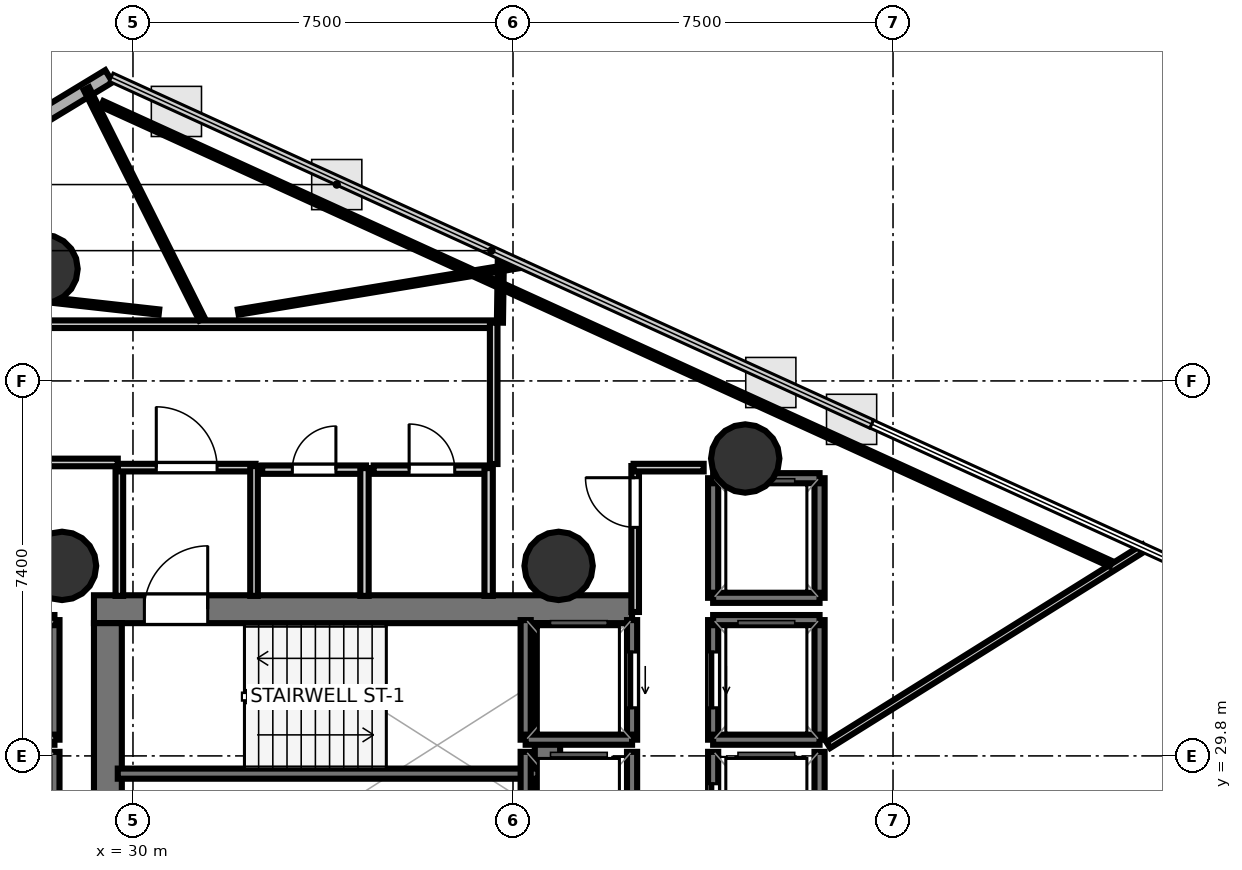
"""IFC4 building model, lengths in metres.
Left out: names, types, materials, properties, quantities, classifications, styles, units other than length and angle.
Written with IfcOpenShell. Run it as: python <this file> out.ifc"""

import sys

from ifc_helpers import new_model, si_unit, direction, frame, frame_2d, origin, origin_2d, place, context, subcontext, project, spatial, rectangle, hollow_circle, extrude, element, fill, save


model = new_model("IFC4")
c1 = context("Model", 3, precision=1e-05, world=origin(), true_north=direction((0.0, 1.0)))
c2 = subcontext(c1, "Body", "Model", "MODEL_VIEW")
j1 = project(units=[si_unit("LENGTHUNIT", "METRE"), si_unit("PLANEANGLEUNIT", "RADIAN")], contexts=[c1])
p1 = place(None, origin())
s1 = spatial("IfcSite", under=j1, at=p1, CompositionType="ELEMENT")
p2 = place(p1, origin())
s2 = spatial("IfcBuilding", under=s1, at=p2, CompositionType="ELEMENT")
p3 = place(p2, frame((0.0, 0.0, 147.6)))
s3 = spatial("IfcBuildingStorey", under=s2, at=p3, CompositionType="ELEMENT", Elevation=147.6)
p4 = place(p3, frame((29.23, 32.695, 0.0), z_axis=(0.0, 0.0, 1.0), x_axis=(1.0, 0.0, 0.0)))
e1 = element("IfcWall", 1, at=p4, inside=s3, PredefinedType="SHEAR", context=c2, shape_type="SweptSolid", body=[
    extrude(rectangle(XDim=10.62, YDim=0.55, at=frame_2d((5.31, 0.0))), origin(), (0.0, 0.0, 1.0), 3.52),
])
p5 = place(p4, frame((0.995, 0.0, 0.0)))
e2 = element("IfcOpeningElement", 2, at=p5, cuts=e1, PredefinedType="OPENING", context=c2, shape_type="SweptSolid", body=[
    extrude(rectangle(XDim=1.25, YDim=2.15, at=frame_2d((0.625, 1.075))), frame((0.0, 0.285, 0.0), z_axis=(0.0, -1.0, 0.0), x_axis=(1.0, 0.0, 0.0)), (0.0, 0.0, 1.0), 0.57),
])
p6 = place(p3, frame((29.505, 24.98, 0.0), z_axis=(0.0, 0.0, 1.0), x_axis=(0.0, 1.0, 0.0)))
e3 = element("IfcWall", 3, at=p6, inside=s3, PredefinedType="SHEAR", context=c2, shape_type="SweptSolid", body=[
    extrude(rectangle(XDim=7.44, YDim=0.55, at=frame_2d((3.72, 0.0))), origin(), (0.0, 0.0, 1.0), 3.52),
])
p7 = place(p3, frame((38.18, 24.98, 0.0), z_axis=(0.0, 0.0, 1.0), x_axis=(0.0, 1.0, 0.0)))
e4 = element("IfcWall", 4, at=p7, inside=s3, PredefinedType="SHEAR", context=c2, shape_type="SweptSolid", body=[
    extrude(rectangle(XDim=7.44, YDim=0.5, at=frame_2d((3.72, 0.0))), origin(), (0.0, 0.0, 1.0), 3.52),
])
for number, where, z_axis, x_axis in (
    (5, (28.6, 33.55, 0.0), (0.0, 0.0, 1.0), (1.0, 0.0, 0.0)),
    (6, (38.4, 33.55, 0.0), (0.0, 0.0, 1.0), (1.0, 0.0, 0.0)),
    (7, (42.083, 35.669, 0.0), (0.0, 0.0, 1.0), (1.0, 0.0, 0.0)),
    (8, (28.235, 39.411, 0.0), (0.0, 0.0, 1.0), (1.0, 0.0, 0.0)),
):
    element("IfcColumn", number, at=place(p3, frame(where, z_axis=z_axis, x_axis=x_axis)), inside=s3, PredefinedType="COLUMN", context=c2, shape_type="SweptSolid", body=[
        extrude(hollow_circle(Radius=0.675, WallThickness=0.032, at=origin_2d()), origin(), (0.0, 0.0, 1.0), 3.7),
    ])
p8 = place(p3, frame((29.525, 43.213, 0.0), z_axis=(0.0, 0.0, 1.0), x_axis=(-0.855139521109, -0.518397916119, 0.0)))
e9 = element("IfcWall", 9, at=p8, inside=s3, PredefinedType="SOLIDWALL", context=c2, shape_type="SweptSolid", body=[
    extrude(rectangle(XDim=9.28, YDim=0.28, at=frame_2d((4.64, 0.0))), origin(), (0.0, 0.0, 1.0), 3.52),
])
p9 = place(p8, frame((2.034, 0.0, 0.85)))
e10 = element("IfcOpeningElement", 10, at=p9, cuts=e9, PredefinedType="OPENING", context=c2, shape_type="SweptSolid", body=[
    extrude(rectangle(XDim=1.5, YDim=2.1, at=frame_2d((0.75, 1.05))), frame((0.0, 0.15, 0.0), z_axis=(0.0, -1.0, 0.0), x_axis=(1.0, 0.0, 0.0)), (0.0, 0.0, 1.0), 0.3),
])
p10 = place(p8, frame((5.426, 0.0, 0.85)))
e11 = element("IfcOpeningElement", 11, at=p10, cuts=e9, PredefinedType="OPENING", context=c2, shape_type="SweptSolid", body=[
    extrude(rectangle(XDim=1.5, YDim=2.1, at=frame_2d((0.75, 1.05))), frame((0.0, 0.15, 0.0), z_axis=(0.0, -1.0, 0.0), x_axis=(1.0, 0.0, 0.0)), (0.0, 0.0, 1.0), 0.3),
])
p11 = place(p3, frame((29.7, 29.45, 0.0), z_axis=(0.0, 0.0, 1.0), x_axis=(1.0, 0.0, 0.0)))
e12 = element("IfcWall", 12, at=p11, inside=s3, PredefinedType="SOLIDWALL", context=c2, shape_type="SweptSolid", body=[
    extrude(rectangle(XDim=8.3, YDim=0.2, at=frame_2d((4.15, 0.0))), origin(), (0.0, 0.0, 1.0), 3.52),
])
p12 = place(p3, frame((39.85, 30.12, 0.0), z_axis=(0.0, 0.0, 1.0), x_axis=(0.0, 1.0, 0.0)))
e13 = element("IfcWall", 13, at=p12, inside=s3, PredefinedType="SOLIDWALL", context=c2, shape_type="SweptSolid", body=[
    extrude(rectangle(XDim=2.36, YDim=0.2, at=frame_2d((1.18, 0.0))), origin(), (0.0, 0.0, 1.0), 3.52),
])
p13 = place(p12, frame((0.63, 0.0, 0.0)))
e14 = element("IfcOpeningElement", 14, at=p13, cuts=e13, PredefinedType="OPENING", context=c2, shape_type="SweptSolid", body=[
    extrude(rectangle(XDim=1.1, YDim=2.15, at=frame_2d((0.55, 1.075))), frame((0.0, 0.11, 0.0), z_axis=(0.0, -1.0, 0.0), x_axis=(1.0, 0.0, 0.0)), (0.0, 0.0, 1.0), 0.22),
])
p14 = place(p3, frame((37.75, 30.12, 0.0), z_axis=(0.0, 0.0, 1.0), x_axis=(0.0, 1.0, 0.0)))
e15 = element("IfcWall", 15, at=p14, inside=s3, PredefinedType="SOLIDWALL", context=c2, shape_type="SweptSolid", body=[
    extrude(rectangle(XDim=2.36, YDim=0.2, at=frame_2d((1.18, 0.0))), origin(), (0.0, 0.0, 1.0), 3.52),
])
p15 = place(p3, frame((37.75, 30.12, 0.0), z_axis=(0.0, 0.0, 1.0), x_axis=(1.0, 0.0, 0.0)))
e16 = element("IfcWall", 16, at=p15, inside=s3, PredefinedType="SOLIDWALL", context=c2, shape_type="SweptSolid", body=[
    extrude(rectangle(XDim=2.1, YDim=0.2, at=frame_2d((1.05, 0.0))), origin(), (0.0, 0.0, 1.0), 3.52),
])
p16 = place(p3, frame((28.45, 30.12, 0.0), z_axis=(0.0, 0.0, 1.0), x_axis=(0.0, 1.0, 0.0)))
e17 = element("IfcWall", 17, at=p16, inside=s3, PredefinedType="SOLIDWALL", context=c2, shape_type="SweptSolid", body=[
    extrude(rectangle(XDim=2.36, YDim=0.2, at=frame_2d((1.18, 0.0))), origin(), (0.0, 0.0, 1.0), 3.52),
])
for number, where, z_axis, x_axis in (
    (18, (26.35, 32.48, 0.0), (0.0, 0.0, 1.0), (1.0, 0.0, 0.0)),
    (19, (26.35, 30.12, 0.0), (0.0, 0.0, 1.0), (1.0, 0.0, 0.0)),
):
    element("IfcWall", number, at=place(p3, frame(where, z_axis=z_axis, x_axis=x_axis)), inside=s3, PredefinedType="SOLIDWALL", context=c2, shape_type="SweptSolid", body=[
        extrude(rectangle(XDim=2.1, YDim=0.2, at=frame_2d((1.05, 0.0))), origin(), (0.0, 0.0, 1.0), 3.52),
    ])
for number, where, z_axis, x_axis in (
    (20, (28.45, 27.52, 0.0), (0.0, 0.0, 1.0), (0.0, 1.0, 0.0)),
    (21, (43.55, 30.12, 0.0), (0.0, 0.0, 1.0), (0.0, 1.0, 0.0)),
):
    element("IfcWall", number, at=place(p3, frame(where, z_axis=z_axis, x_axis=x_axis)), inside=s3, PredefinedType="SOLIDWALL", context=c2, shape_type="SweptSolid", body=[
        extrude(rectangle(XDim=2.36, YDim=0.2, at=frame_2d((1.18, 0.0))), origin(), (0.0, 0.0, 1.0), 3.52),
    ])
p17 = place(p3, frame((41.45, 30.12, 0.0), z_axis=(0.0, 0.0, 1.0), x_axis=(0.0, 1.0, 0.0)))
e22 = element("IfcWall", 22, at=p17, inside=s3, PredefinedType="SOLIDWALL", context=c2, shape_type="SweptSolid", body=[
    extrude(rectangle(XDim=2.36, YDim=0.2, at=frame_2d((1.18, 0.0))), origin(), (0.0, 0.0, 1.0), 3.52),
])
p18 = place(p17, frame((0.63, 0.0, 0.0)))
e23 = element("IfcOpeningElement", 23, at=p18, cuts=e22, PredefinedType="OPENING", context=c2, shape_type="SweptSolid", body=[
    extrude(rectangle(XDim=1.1, YDim=2.15, at=frame_2d((0.55, 1.075))), frame((0.0, 0.11, 0.0), z_axis=(0.0, -1.0, 0.0), x_axis=(1.0, 0.0, 0.0)), (0.0, 0.0, 1.0), 0.22),
])
for number, where, z_axis, x_axis in (
    (24, (41.45, 32.48, 0.0), (0.0, 0.0, 1.0), (1.0, 0.0, 0.0)),
    (25, (41.45, 30.12, 0.0), (0.0, 0.0, 1.0), (1.0, 0.0, 0.0)),
):
    element("IfcWall", number, at=place(p3, frame(where, z_axis=z_axis, x_axis=x_axis)), inside=s3, PredefinedType="SOLIDWALL", context=c2, shape_type="SweptSolid", body=[
        extrude(rectangle(XDim=2.1, YDim=0.2, at=frame_2d((1.05, 0.0))), origin(), (0.0, 0.0, 1.0), 3.52),
    ])
p19 = place(p3, frame((43.55, 27.52, 0.0), z_axis=(0.0, 0.0, 1.0), x_axis=(0.0, 1.0, 0.0)))
e26 = element("IfcWall", 26, at=p19, inside=s3, PredefinedType="SOLIDWALL", context=c2, shape_type="SweptSolid", body=[
    extrude(rectangle(XDim=2.36, YDim=0.2, at=frame_2d((1.18, 0.0))), origin(), (0.0, 0.0, 1.0), 3.52),
])
p20 = place(p3, frame((41.45, 27.52, 0.0), z_axis=(0.0, 0.0, 1.0), x_axis=(0.0, 1.0, 0.0)))
e27 = element("IfcWall", 27, at=p20, inside=s3, PredefinedType="SOLIDWALL", context=c2, shape_type="SweptSolid", body=[
    extrude(rectangle(XDim=2.36, YDim=0.2, at=frame_2d((1.18, 0.0))), origin(), (0.0, 0.0, 1.0), 3.52),
])
p21 = place(p20, frame((0.63, 0.0, 0.0)))
e28 = element("IfcOpeningElement", 28, at=p21, cuts=e27, PredefinedType="OPENING", context=c2, shape_type="SweptSolid", body=[
    extrude(rectangle(XDim=1.1, YDim=2.15, at=frame_2d((0.55, 1.075))), frame((0.0, 0.11, 0.0), z_axis=(0.0, -1.0, 0.0), x_axis=(1.0, 0.0, 0.0)), (0.0, 0.0, 1.0), 0.22),
])
for number, where, z_axis, x_axis in (
    (29, (39.85, 27.52, 0.0), (0.0, 0.0, 1.0), (0.0, 1.0, 0.0)),
    (30, (37.75, 27.52, 0.0), (0.0, 0.0, 1.0), (0.0, 1.0, 0.0)),
):
    element("IfcWall", number, at=place(p3, frame(where, z_axis=z_axis, x_axis=x_axis)), inside=s3, PredefinedType="SOLIDWALL", context=c2, shape_type="SweptSolid", body=[
        extrude(rectangle(XDim=2.36, YDim=0.2, at=frame_2d((1.18, 0.0))), origin(), (0.0, 0.0, 1.0), 3.52),
    ])
for number, where, z_axis, x_axis in (
    (31, (43.55, 32.92, 0.0), (0.0, 0.0, 1.0), (0.0, 1.0, 0.0)),
    (32, (41.45, 32.92, 0.0), (0.0, 0.0, 1.0), (0.0, 1.0, 0.0)),
):
    element("IfcWall", number, at=place(p3, frame(where, z_axis=z_axis, x_axis=x_axis)), inside=s3, PredefinedType="SOLIDWALL", context=c2, shape_type="SweptSolid", body=[
        extrude(rectangle(XDim=2.36, YDim=0.2, at=frame_2d((1.18, 0.0))), origin(), (0.0, 0.0, 1.0), 3.52),
    ])
for number, where, z_axis, x_axis in (
    (33, (41.45, 35.28, 0.0), (0.0, 0.0, 1.0), (1.0, 0.0, 0.0)),
    (34, (41.45, 32.92, 0.0), (0.0, 0.0, 1.0), (1.0, 0.0, 0.0)),
):
    element("IfcWall", number, at=place(p3, frame(where, z_axis=z_axis, x_axis=x_axis)), inside=s3, PredefinedType="SOLIDWALL", context=c2, shape_type="SweptSolid", body=[
        extrude(rectangle(XDim=2.1, YDim=0.2, at=frame_2d((1.05, 0.0))), origin(), (0.0, 0.0, 1.0), 3.52),
    ])
p22 = place(p3, frame((29.731, 32.958, 0.0), z_axis=(0.0, 0.0, 1.0), x_axis=(0.0, 1.0, 0.0)))
e35 = element("IfcWall", 35, at=p22, inside=s3, PredefinedType="PARTITIONING", context=c2, shape_type="SweptSolid", body=[
    extrude(rectangle(XDim=2.562, YDim=0.15, at=frame_2d((1.281, 0.0))), origin(), (0.0, 0.0, 1.0), 2.84),
])
p23 = place(p3, frame((29.7, 35.489, 0.0), z_axis=(0.0, 0.0, 1.0), x_axis=(1.0, 0.0, 0.0)))
e36 = element("IfcWall", 36, at=p23, inside=s3, PredefinedType="PARTITIONING", context=c2, shape_type="SweptSolid", body=[
    extrude(rectangle(XDim=2.72, YDim=0.15, at=frame_2d((1.36, 0.0))), origin(), (0.0, 0.0, 1.0), 2.84),
])
p24 = place(p23, frame((0.76, 0.0, 0.0)))
e37 = element("IfcOpeningElement", 37, at=p24, cuts=e36, PredefinedType="OPENING", context=c2, shape_type="SweptSolid", body=[
    extrude(rectangle(XDim=1.2, YDim=2.15, at=frame_2d((0.6, 1.075))), frame((0.0, 0.085, 0.0), z_axis=(0.0, -1.0, 0.0), x_axis=(1.0, 0.0, 0.0)), (0.0, 0.0, 1.0), 0.17),
])
p25 = place(p3, frame((32.389, 35.52, 0.0), z_axis=(0.0, 0.0, 1.0), x_axis=(0.0, -1.0, 0.0)))
e38 = element("IfcWall", 38, at=p25, inside=s3, PredefinedType="PARTITIONING", context=c2, shape_type="SweptSolid", body=[
    extrude(rectangle(XDim=2.562, YDim=0.15, at=frame_2d((1.281, 0.0))), origin(), (0.0, 0.0, 1.0), 2.84),
])
p26 = place(p3, frame((39.911, 32.64, 0.0), z_axis=(0.0, 0.0, 1.0), x_axis=(0.0, 1.0, 0.0)))
e39 = element("IfcWall", 39, at=p26, inside=s3, PredefinedType="PARTITIONING", context=c2, shape_type="SweptSolid", body=[
    extrude(rectangle(XDim=2.88, YDim=0.15, at=frame_2d((1.44, 0.0))), origin(), (0.0, 0.0, 1.0), 2.84),
])
p27 = place(p26, frame((1.67, 0.0, 0.0)))
e40 = element("IfcOpeningElement", 40, at=p27, cuts=e39, PredefinedType="OPENING", context=c2, shape_type="SweptSolid", body=[
    extrude(rectangle(XDim=0.98, YDim=2.1, at=frame_2d((0.49, 1.05))), frame((0.0, 0.085, 0.0), z_axis=(0.0, -1.0, 0.0), x_axis=(1.0, 0.0, 0.0)), (0.0, 0.0, 1.0), 0.17),
])
p28 = place(p3, frame((39.88, 35.489, 0.0), z_axis=(0.0, 0.0, 1.0), x_axis=(1.0, 0.0, 0.0)))
e41 = element("IfcWall", 41, at=p28, inside=s3, PredefinedType="PARTITIONING", context=c2, shape_type="SweptSolid", body=[
    extrude(rectangle(XDim=1.383, YDim=0.15, at=frame_2d((0.691, 0.0))), origin(), (0.0, 0.0, 1.0), 2.84),
])
p29 = place(p3, frame((32.55, 35.449, 0.0), z_axis=(0.0, 0.0, 1.0), x_axis=(1.0, 0.0, 0.0)))
e42 = element("IfcWall", 42, at=p29, inside=s3, PredefinedType="PLUMBINGWALL", context=c2, shape_type="SweptSolid", body=[
    extrude(rectangle(XDim=2.05, YDim=0.165, at=frame_2d((1.025, 0.0))), origin(), (0.0, 0.0, 1.0), 2.84),
])
p30 = place(p29, frame((0.595, 0.0, 0.0)))
e43 = element("IfcOpeningElement", 43, at=p30, cuts=e42, PredefinedType="OPENING", context=c2, shape_type="SweptSolid", body=[
    extrude(rectangle(XDim=0.86, YDim=2.05, at=frame_2d((0.43, 1.025))), frame((0.0, 0.093, 0.0), z_axis=(0.0, -1.0, 0.0), x_axis=(1.0, 0.0, 0.0)), (0.0, 0.0, 1.0), 0.185),
])
p31 = place(p3, frame((34.569, 35.48, 0.0), z_axis=(0.0, 0.0, 1.0), x_axis=(0.0, -1.0, 0.0)))
e44 = element("IfcWall", 44, at=p31, inside=s3, PredefinedType="PLUMBINGWALL", context=c2, shape_type="SweptSolid", body=[
    extrude(rectangle(XDim=2.522, YDim=0.165, at=frame_2d((1.261, 0.0))), origin(), (0.0, 0.0, 1.0), 2.84),
])
p32 = place(p3, frame((34.75, 35.449, 0.0), z_axis=(0.0, 0.0, 1.0), x_axis=(1.0, 0.0, 0.0)))
e45 = element("IfcWall", 45, at=p32, inside=s3, PredefinedType="PLUMBINGWALL", context=c2, shape_type="SweptSolid", body=[
    extrude(rectangle(XDim=2.3, YDim=0.165, at=frame_2d((1.15, 0.0))), origin(), (0.0, 0.0, 1.0), 2.84),
])
p33 = place(p32, frame((0.7, 0.0, 0.0)))
e46 = element("IfcOpeningElement", 46, at=p33, cuts=e45, PredefinedType="OPENING", context=c2, shape_type="SweptSolid", body=[
    extrude(rectangle(XDim=0.9, YDim=2.1, at=frame_2d((0.45, 1.05))), frame((0.0, 0.093, 0.0), z_axis=(0.0, -1.0, 0.0), x_axis=(1.0, 0.0, 0.0)), (0.0, 0.0, 1.0), 0.185),
])
p34 = place(p3, frame((37.019, 35.48, 0.0), z_axis=(0.0, 0.0, 1.0), x_axis=(0.0, -1.0, 0.0)))
e47 = element("IfcWall", 47, at=p34, inside=s3, PredefinedType="PLUMBINGWALL", context=c2, shape_type="SweptSolid", body=[
    extrude(rectangle(XDim=2.522, YDim=0.165, at=frame_2d((1.261, 0.0))), origin(), (0.0, 0.0, 1.0), 2.84),
])
p35 = place(p3, frame((23.75, 38.319, 0.0), z_axis=(0.0, 0.0, 1.0), x_axis=(1.0, 0.0, 0.0)))
e48 = element("IfcWall", 48, at=p35, inside=s3, PredefinedType="PARTITIONING", context=c2, shape_type="SweptSolid", body=[
    extrude(rectangle(XDim=13.4, YDim=0.15, at=frame_2d((6.7, 0.0))), origin(), (0.0, 0.0, 1.0), 2.84),
])
p36 = place(p3, frame((37.119, 38.35, 0.0), z_axis=(0.0, 0.0, 1.0), x_axis=(0.0, -1.0, 0.0)))
e49 = element("IfcWall", 49, at=p36, inside=s3, PredefinedType="PARTITIONING", context=c2, shape_type="SweptSolid", body=[
    extrude(rectangle(XDim=2.79, YDim=0.15, at=frame_2d((1.395, 0.0))), origin(), (0.0, 0.0, 1.0), 2.84),
])
p37 = place(p3, frame((29.7, 35.591, 0.0), z_axis=(0.0, 0.0, 1.0), x_axis=(-1.0, 0.0, 0.0)))
e50 = element("IfcWall", 50, at=p37, inside=s3, PredefinedType="PARTITIONING", context=c2, shape_type="SweptSolid", body=[
    extrude(rectangle(XDim=3.12, YDim=0.15, at=frame_2d((1.56, 0.0))), origin(), (0.0, 0.0, 1.0), 2.84),
])
p38 = place(p3, frame((43.723, 30.015, 0.0), z_axis=(0.0, 0.0, 1.0), x_axis=(0.848054240765, 0.529909430677, 0.0)))
e51 = element("IfcWall", 51, at=p38, inside=s3, PredefinedType="PARTITIONING", context=c2, shape_type="SweptSolid", body=[
    extrude(rectangle(XDim=7.355, YDim=0.14, at=frame_2d((3.678, 0.0))), origin(), (0.0, 0.0, 1.0), 2.84),
])
p39 = place(p3, frame((29.082, 42.968, 0.0), z_axis=(0.0, 0.0, 1.0), x_axis=(0.448019013955, -0.894024028276, 0.0)))
e52 = element("IfcWall", 52, at=p39, inside=s3, PredefinedType="PARTITIONING", context=c2, shape_type="SweptSolid", body=[
    extrude(rectangle(XDim=5.091, YDim=0.12, at=frame_2d((2.546, 0.0))), origin(), (0.0, 0.0, 1.0), 2.84),
])
p40 = place(p3, frame((30.513, 38.559, 0.0), z_axis=(0.0, 0.0, 1.0), x_axis=(-0.993829835161, 0.110915547798, 0.0)))
e53 = element("IfcWall", 53, at=p40, inside=s3, PredefinedType="PARTITIONING", context=c2, shape_type="SweptSolid", body=[
    extrude(rectangle(XDim=7.363, YDim=0.105, at=frame_2d((3.681, 0.0))), origin(), (0.0, 0.0, 1.0), 2.84),
])
p41 = place(p3, frame((37.242, 38.35, 0.0), z_axis=(0.0, 0.0, 1.0), x_axis=(0.014227666381, 0.999898781632, 0.0)))
e54 = element("IfcWall", 54, at=p41, inside=s3, PredefinedType="PARTITIONING", context=c2, shape_type="SweptSolid", body=[
    extrude(rectangle(XDim=1.356, YDim=0.12, at=frame_2d((0.678, 0.0))), origin(), (0.0, 0.0, 1.0), 2.84),
])
p42 = place(p3, frame((37.694, 39.488, 0.0), z_axis=(0.0, 0.0, 1.0), x_axis=(-0.986591392512, -0.163209755288, 0.0)))
e55 = element("IfcWall", 55, at=p42, inside=s3, PredefinedType="PARTITIONING", context=c2, shape_type="SweptSolid", body=[
    extrude(rectangle(XDim=5.693, YDim=0.105, at=frame_2d((2.847, 0.0))), origin(), (0.0, 0.0, 1.0), 2.84),
])
p43 = place(p3, frame((29.39, 42.669, 0.0), z_axis=(0.0, 0.0, 1.0), x_axis=(0.90986951671, -0.414894519802, 0.0)))
e56 = element("IfcWall", 56, at=p43, inside=s3, PredefinedType="PARTITIONING", context=c2, shape_type="SweptSolid", body=[
    extrude(rectangle(XDim=21.884, YDim=0.12, at=frame_2d((10.942, 0.0))), origin(), (0.0, 0.0, 1.0), 2.84),
])
p44 = place(p5, origin())
e57 = element("IfcDoor", 57, at=p44, inside=s3, OperationType="SINGLE_SWING_RIGHT", PredefinedType="DOOR", context=c2, shape_type="SweptSolid", body=[
    extrude(rectangle(XDim=1.25, YDim=2.15, at=frame_2d((0.625, 1.075))), frame((0.0, 0.025, 0.0), z_axis=(0.0, -1.0, 0.0), x_axis=(1.0, 0.0, 0.0)), (0.0, 0.0, 1.0), 0.05),
])
fill(e2, e57)
p45 = place(p13, origin())
e58 = element("IfcDoor", 58, at=p45, inside=s3, OperationType="SLIDING_TO_LEFT", PredefinedType="DOOR", context=c2, shape_type="SweptSolid", body=[
    extrude(rectangle(XDim=1.1, YDim=2.15, at=frame_2d((0.55, 1.075))), frame((0.0, 0.025, 0.0), z_axis=(0.0, -1.0, 0.0), x_axis=(1.0, 0.0, 0.0)), (0.0, 0.0, 1.0), 0.05),
])
fill(e14, e58)
p46 = place(p18, origin())
e59 = element("IfcDoor", 59, at=p46, inside=s3, OperationType="SLIDING_TO_LEFT", PredefinedType="DOOR", context=c2, shape_type="SweptSolid", body=[
    extrude(rectangle(XDim=1.1, YDim=2.15, at=frame_2d((0.55, 1.075))), frame((0.0, 0.025, 0.0), z_axis=(0.0, -1.0, 0.0), x_axis=(1.0, 0.0, 0.0)), (0.0, 0.0, 1.0), 0.05),
])
fill(e23, e59)
p47 = place(p21, origin())
e60 = element("IfcDoor", 60, at=p47, inside=s3, OperationType="SLIDING_TO_LEFT", PredefinedType="DOOR", context=c2, shape_type="SweptSolid", body=[
    extrude(rectangle(XDim=1.1, YDim=2.15, at=frame_2d((0.55, 1.075))), frame((0.0, 0.025, 0.0), z_axis=(0.0, -1.0, 0.0), x_axis=(1.0, 0.0, 0.0)), (0.0, 0.0, 1.0), 0.05),
])
fill(e28, e60)
p48 = place(p24, origin())
e61 = element("IfcDoor", 61, at=p48, inside=s3, OperationType="SINGLE_SWING_LEFT", PredefinedType="DOOR", context=c2, shape_type="SweptSolid", body=[
    extrude(rectangle(XDim=1.2, YDim=2.15, at=frame_2d((0.6, 1.075))), frame((0.0, 0.025, 0.0), z_axis=(0.0, -1.0, 0.0), x_axis=(1.0, 0.0, 0.0)), (0.0, 0.0, 1.0), 0.05),
])
fill(e37, e61)
p49 = place(p30, origin())
e62 = element("IfcDoor", 62, at=p49, inside=s3, OperationType="SINGLE_SWING_RIGHT", PredefinedType="DOOR", context=c2, shape_type="SweptSolid", body=[
    extrude(rectangle(XDim=0.86, YDim=2.05, at=frame_2d((0.43, 1.025))), frame((0.0, 0.025, 0.0), z_axis=(0.0, -1.0, 0.0), x_axis=(1.0, 0.0, 0.0)), (0.0, 0.0, 1.0), 0.05),
])
fill(e43, e62)
p50 = place(p33, origin())
e63 = element("IfcDoor", 63, at=p50, inside=s3, OperationType="SINGLE_SWING_LEFT", PredefinedType="DOOR", context=c2, shape_type="SweptSolid", body=[
    extrude(rectangle(XDim=0.9, YDim=2.1, at=frame_2d((0.45, 1.05))), frame((0.0, 0.025, 0.0), z_axis=(0.0, -1.0, 0.0), x_axis=(1.0, 0.0, 0.0)), (0.0, 0.0, 1.0), 0.05),
])
fill(e46, e63)
p51 = place(p27, origin())
e64 = element("IfcDoor", 64, at=p51, inside=s3, OperationType="SINGLE_SWING_RIGHT", PredefinedType="DOOR", context=c2, shape_type="SweptSolid", body=[
    extrude(rectangle(XDim=0.98, YDim=2.1, at=frame_2d((0.49, 1.05))), frame((0.0, 0.025, 0.0), z_axis=(0.0, -1.0, 0.0), x_axis=(1.0, 0.0, 0.0)), (0.0, 0.0, 1.0), 0.05),
])
fill(e40, e64)
save(model, sys.argv[1])
